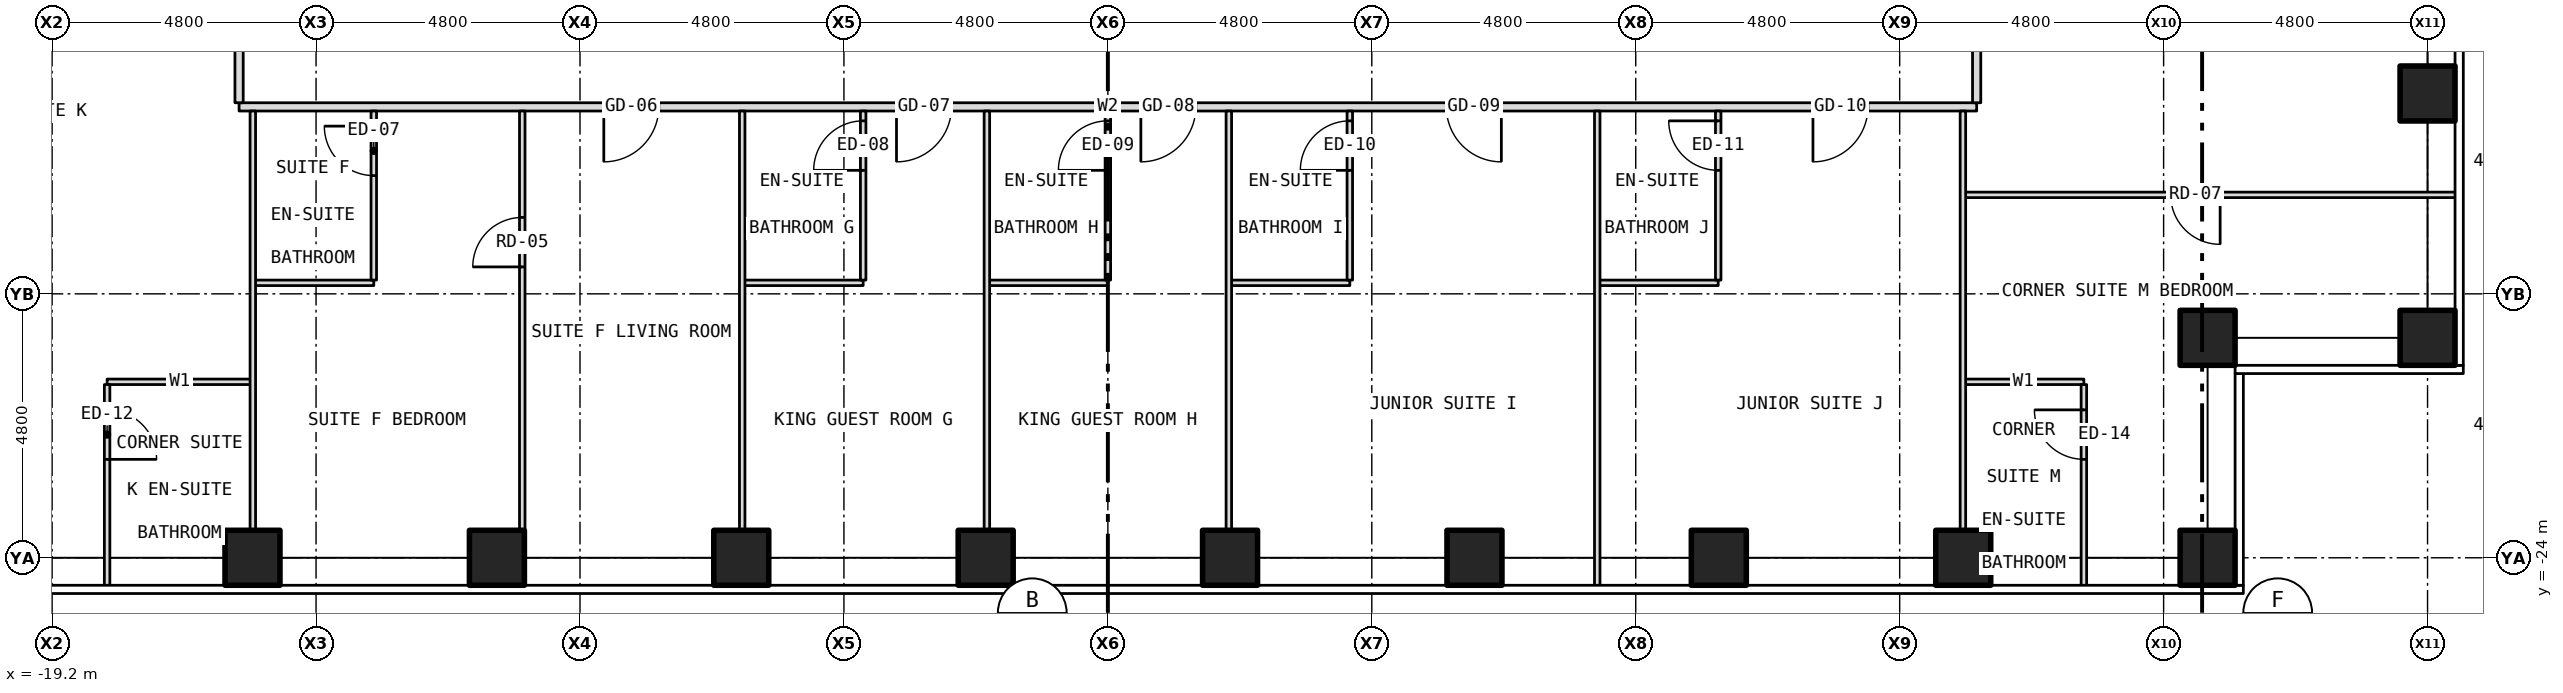
"""IFC4 building model, lengths in metres.
Left out: names, types, materials, properties, quantities, classifications, styles, units other than length and angle.
Written with IfcOpenShell. Run it as: python <this file> out.ifc"""

import sys

from ifc_helpers import new_model, si_unit, direction, frame, frame_2d, origin, origin_2d, place, context, subcontext, project, spatial, rectangle, hollow_rectangle, extrude, element, fill, save


model = new_model("IFC4")
c1 = context("Model", 3, precision=1e-05, world=origin(), true_north=direction((0.0, 1.0)))
c2 = subcontext(c1, "Body", "Model", "MODEL_VIEW")
j1 = project(units=[si_unit("LENGTHUNIT", "METRE"), si_unit("PLANEANGLEUNIT", "RADIAN")], contexts=[c1])
p1 = place(None, origin())
s1 = spatial("IfcSite", under=j1, at=p1, CompositionType="ELEMENT")
p2 = place(p1, origin())
s2 = spatial("IfcBuilding", under=s1, at=p2, CompositionType="ELEMENT")
p3 = place(p2, frame((0.0, 0.0, 46.0)))
s3 = spatial("IfcBuildingStorey", under=s2, at=p3, CompositionType="ELEMENT", Elevation=46.0)
for number, where, z_axis, x_axis in (
    (1, (-15.556, -24.0, -0.15), (0.0, 0.0, 1.0), (1.0, 0.0, 0.0)),
    (2, (-11.111, -24.0, -0.15), (0.0, 0.0, 1.0), (1.0, 0.0, 0.0)),
    (3, (-6.667, -24.0, -0.15), (0.0, 0.0, 1.0), (1.0, 0.0, 0.0)),
    (4, (-2.222, -24.0, -0.15), (0.0, 0.0, 1.0), (1.0, 0.0, 0.0)),
    (5, (2.222, -24.0, -0.15), (0.0, 0.0, 1.0), (1.0, 0.0, 0.0)),
    (6, (6.667, -24.0, -0.15), (0.0, 0.0, 1.0), (1.0, 0.0, 0.0)),
    (7, (11.111, -24.0, -0.15), (0.0, 0.0, 1.0), (1.0, 0.0, 0.0)),
    (8, (15.556, -24.0, -0.15), (0.0, 0.0, 1.0), (1.0, 0.0, 0.0)),
    (9, (20.0, -24.0, -0.15), (0.0, 0.0, 1.0), (1.0, 0.0, 0.0)),
    (10, (24.0, -20.0, -0.15), (0.0, 0.0, 1.0), (1.0, 0.0, 0.0)),
    (11, (24.0, -15.556, -0.15), (0.0, 0.0, 1.0), (1.0, 0.0, 0.0)),
    (12, (20.0, -20.0, -0.15), (0.0, 0.0, 1.0), (1.0, 0.0, 0.0)),
):
    element("IfcColumn", number, at=place(p3, frame(where, z_axis=z_axis, x_axis=x_axis)), inside=s3, PredefinedType="COLUMN", context=c2, shape_type="SweptSolid", body=[
        extrude(hollow_rectangle(XDim=1.0, YDim=1.0, WallThickness=0.06, at=origin_2d()), origin(), (0.0, 0.0, 1.0), 3.5),
    ])
p4 = place(p3, frame((-18.2, -20.8, 0.0), z_axis=(0.0, 0.0, 1.0), x_axis=(1.0, 0.0, 0.0)))
e13 = element("IfcWall", 13, at=p4, inside=s3, PredefinedType="PARTITIONING", context=c2, shape_type="SweptSolid", body=[
    extrude(rectangle(XDim=2.65, YDim=0.1, at=frame_2d((1.325, 0.0))), origin(), (0.0, 0.0, 1.0), 3.35),
])
for number, where, z_axis, x_axis in (
    (14, (15.55, -20.8, 0.0), (0.0, 0.0, 1.0), (1.0, 0.0, 0.0)),
    (15, (-15.55, -19.0, 0.0), (0.0, 0.0, 1.0), (1.0, 0.0, 0.0)),
    (16, (-6.65, -19.0, 0.0), (0.0, 0.0, 1.0), (1.0, 0.0, 0.0)),
    (17, (-2.2, -19.0, 0.0), (0.0, 0.0, 1.0), (1.0, 0.0, 0.0)),
    (18, (2.2, -19.0, 0.0), (0.0, 0.0, 1.0), (1.0, 0.0, 0.0)),
):
    element("IfcWall", number, at=place(p3, frame(where, z_axis=z_axis, x_axis=x_axis)), inside=s3, PredefinedType="PARTITIONING", context=c2, shape_type="SweptSolid", body=[
        extrude(rectangle(XDim=2.2, YDim=0.1, at=frame_2d((1.1, 0.0))), origin(), (0.0, 0.0, 1.0), 3.35),
    ])
p5 = place(p3, frame((8.9, -19.0, 0.0), z_axis=(0.0, 0.0, 1.0), x_axis=(1.0, 0.0, 0.0)))
e19 = element("IfcWall", 19, at=p5, inside=s3, PredefinedType="PARTITIONING", context=c2, shape_type="SweptSolid", body=[
    extrude(rectangle(XDim=2.2, YDim=0.1, at=frame_2d((1.1, 0.0))), origin(), (0.0, 0.0, 1.0), 3.35),
])
p6 = place(p3, frame((15.55, -17.4, 0.0), z_axis=(0.0, 0.0, 1.0), x_axis=(1.0, 0.0, 0.0)))
e20 = element("IfcWall", 20, at=p6, inside=s3, PredefinedType="PARTITIONING", context=c2, shape_type="SweptSolid", body=[
    extrude(rectangle(XDim=8.98, YDim=0.1, at=frame_2d((4.49, 0.0))), origin(), (0.0, 0.0, 1.0), 3.35),
])
p7 = place(p6, frame((3.778, 0.0, 0.0)))
e21 = element("IfcOpeningElement", 21, at=p7, cuts=e20, PredefinedType="OPENING", context=c2, shape_type="SweptSolid", body=[
    extrude(rectangle(XDim=0.9, YDim=2.1, at=frame_2d((0.45, 1.05))), frame((0.0, 0.062, 0.0), z_axis=(0.0, -1.0, 0.0), x_axis=(1.0, 0.0, 0.0)), (0.0, 0.0, 1.0), 0.124),
])
p8 = place(p3, frame((-15.8, -15.8, 0.0), z_axis=(0.0, 0.0, 1.0), x_axis=(1.0, 0.0, 0.0)))
e22 = element("IfcWall", 22, at=p8, inside=s3, PredefinedType="PARTITIONING", context=c2, shape_type="SweptSolid", body=[
    extrude(rectangle(XDim=31.6, YDim=0.15, at=frame_2d((15.8, 0.0))), origin(), (0.0, 0.0, 1.0), 3.35),
])
p9 = place(p8, frame((6.633, 0.0, 0.0)))
e23 = element("IfcOpeningElement", 23, at=p9, cuts=e22, PredefinedType="OPENING", context=c2, shape_type="SweptSolid", body=[
    extrude(rectangle(XDim=1.0, YDim=2.1, at=frame_2d((0.5, 1.05))), frame((0.0, 0.087, 0.0), z_axis=(0.0, -1.0, 0.0), x_axis=(1.0, 0.0, 0.0)), (0.0, 0.0, 1.0), 0.174),
])
p10 = place(p8, frame((11.956, 0.0, 0.0)))
e24 = element("IfcOpeningElement", 24, at=p10, cuts=e22, PredefinedType="OPENING", context=c2, shape_type="SweptSolid", body=[
    extrude(rectangle(XDim=1.0, YDim=2.1, at=frame_2d((0.5, 1.05))), frame((0.0, 0.087, 0.0), z_axis=(0.0, -1.0, 0.0), x_axis=(1.0, 0.0, 0.0)), (0.0, 0.0, 1.0), 0.174),
])
p11 = place(p8, frame((16.4, 0.0, 0.0)))
e25 = element("IfcOpeningElement", 25, at=p11, cuts=e22, PredefinedType="OPENING", context=c2, shape_type="SweptSolid", body=[
    extrude(rectangle(XDim=1.0, YDim=2.1, at=frame_2d((0.5, 1.05))), frame((0.0, 0.087, 0.0), z_axis=(0.0, -1.0, 0.0), x_axis=(1.0, 0.0, 0.0)), (0.0, 0.0, 1.0), 0.174),
])
p12 = place(p8, frame((21.956, 0.0, 0.0)))
e26 = element("IfcOpeningElement", 26, at=p12, cuts=e22, PredefinedType="OPENING", context=c2, shape_type="SweptSolid", body=[
    extrude(rectangle(XDim=1.0, YDim=2.1, at=frame_2d((0.5, 1.05))), frame((0.0, 0.087, 0.0), z_axis=(0.0, -1.0, 0.0), x_axis=(1.0, 0.0, 0.0)), (0.0, 0.0, 1.0), 0.174),
])
p13 = place(p8, frame((28.623, 0.0, 0.0)))
e27 = element("IfcOpeningElement", 27, at=p13, cuts=e22, PredefinedType="OPENING", context=c2, shape_type="SweptSolid", body=[
    extrude(rectangle(XDim=1.0, YDim=2.1, at=frame_2d((0.5, 1.05))), frame((0.0, 0.087, 0.0), z_axis=(0.0, -1.0, 0.0), x_axis=(1.0, 0.0, 0.0)), (0.0, 0.0, 1.0), 0.174),
])
p14 = place(p3, frame((-18.2, -24.53, 0.0), z_axis=(0.0, 0.0, 1.0), x_axis=(0.0, 1.0, 0.0)))
e28 = element("IfcWall", 28, at=p14, inside=s3, PredefinedType="PARTITIONING", context=c2, shape_type="SweptSolid", body=[
    extrude(rectangle(XDim=3.68, YDim=0.1, at=frame_2d((1.84, 0.0))), origin(), (0.0, 0.0, 1.0), 3.35),
])
p15 = place(p14, frame((2.32, 0.0, 0.0)))
e29 = element("IfcOpeningElement", 29, at=p15, cuts=e28, PredefinedType="OPENING", context=c2, shape_type="SweptSolid", body=[
    extrude(rectangle(XDim=0.9, YDim=2.1, at=frame_2d((0.45, 1.05))), frame((0.0, 0.062, 0.0), z_axis=(0.0, -1.0, 0.0), x_axis=(1.0, 0.0, 0.0)), (0.0, 0.0, 1.0), 0.124),
])
p16 = place(p3, frame((-15.8, -15.725, 0.0), z_axis=(0.0, 0.0, 1.0), x_axis=(0.0, 1.0, 0.0)))
e30 = element("IfcWall", 30, at=p16, inside=s3, PredefinedType="PARTITIONING", context=c2, shape_type="SweptSolid", body=[
    extrude(rectangle(XDim=4.805, YDim=0.15, at=frame_2d((2.403, 0.0))), origin(), (0.0, 0.0, 1.0), 3.35),
])
p17 = place(p16, frame((3.025, 0.0, 0.0)))
e31 = element("IfcOpeningElement", 31, at=p17, cuts=e30, PredefinedType="OPENING", context=c2, shape_type="SweptSolid", body=[
    extrude(rectangle(XDim=1.0, YDim=2.1, at=frame_2d((0.5, 1.05))), frame((0.0, 0.087, 0.0), z_axis=(0.0, -1.0, 0.0), x_axis=(1.0, 0.0, 0.0)), (0.0, 0.0, 1.0), 0.174),
])
p18 = place(p3, frame((-15.55, -23.88, 0.0), z_axis=(0.0, 0.0, 1.0), x_axis=(0.0, 1.0, 0.0)))
e32 = element("IfcWall", 32, at=p18, inside=s3, PredefinedType="PARTITIONING", context=c2, shape_type="SweptSolid", body=[
    extrude(rectangle(XDim=8.005, YDim=0.1, at=frame_2d((4.002, 0.0))), origin(), (0.0, 0.0, 1.0), 3.35),
])
p19 = place(p3, frame((-13.35, -18.95, 0.0), z_axis=(0.0, 0.0, 1.0), x_axis=(0.0, 1.0, 0.0)))
e33 = element("IfcWall", 33, at=p19, inside=s3, PredefinedType="PARTITIONING", context=c2, shape_type="SweptSolid", body=[
    extrude(rectangle(XDim=3.075, YDim=0.1, at=frame_2d((1.538, 0.0))), origin(), (0.0, 0.0, 1.0), 3.35),
])
p20 = place(p19, frame((1.9, 0.0, 0.0)))
e34 = element("IfcOpeningElement", 34, at=p20, cuts=e33, PredefinedType="OPENING", context=c2, shape_type="SweptSolid", body=[
    extrude(rectangle(XDim=0.9, YDim=2.1, at=frame_2d((0.45, 1.05))), frame((0.0, 0.062, 0.0), z_axis=(0.0, -1.0, 0.0), x_axis=(1.0, 0.0, 0.0)), (0.0, 0.0, 1.0), 0.124),
])
p21 = place(p3, frame((-10.65, -23.88, 0.0), z_axis=(0.0, 0.0, 1.0), x_axis=(0.0, 1.0, 0.0)))
e35 = element("IfcWall", 35, at=p21, inside=s3, PredefinedType="PARTITIONING", context=c2, shape_type="SweptSolid", body=[
    extrude(rectangle(XDim=8.005, YDim=0.1, at=frame_2d((4.002, 0.0))), origin(), (0.0, 0.0, 1.0), 3.35),
])
p22 = place(p21, frame((5.17, 0.0, 0.0)))
e36 = element("IfcOpeningElement", 36, at=p22, cuts=e35, PredefinedType="OPENING", context=c2, shape_type="SweptSolid", body=[
    extrude(rectangle(XDim=0.9, YDim=2.1, at=frame_2d((0.45, 1.05))), frame((0.0, 0.062, 0.0), z_axis=(0.0, -1.0, 0.0), x_axis=(1.0, 0.0, 0.0)), (0.0, 0.0, 1.0), 0.124),
])
p23 = place(p3, frame((-6.65, -23.88, 0.0), z_axis=(0.0, 0.0, 1.0), x_axis=(0.0, 1.0, 0.0)))
e37 = element("IfcWall", 37, at=p23, inside=s3, PredefinedType="PARTITIONING", context=c2, shape_type="SweptSolid", body=[
    extrude(rectangle(XDim=8.005, YDim=0.1, at=frame_2d((4.002, 0.0))), origin(), (0.0, 0.0, 1.0), 3.35),
])
p24 = place(p3, frame((-4.45, -18.95, 0.0), z_axis=(0.0, 0.0, 1.0), x_axis=(0.0, 1.0, 0.0)))
e38 = element("IfcWall", 38, at=p24, inside=s3, PredefinedType="PARTITIONING", context=c2, shape_type="SweptSolid", body=[
    extrude(rectangle(XDim=3.075, YDim=0.1, at=frame_2d((1.538, 0.0))), origin(), (0.0, 0.0, 1.0), 3.35),
])
p25 = place(p24, frame((1.996, 0.0, 0.0)))
e39 = element("IfcOpeningElement", 39, at=p25, cuts=e38, PredefinedType="OPENING", context=c2, shape_type="SweptSolid", body=[
    extrude(rectangle(XDim=0.9, YDim=2.1, at=frame_2d((0.45, 1.05))), frame((0.0, 0.062, 0.0), z_axis=(0.0, -1.0, 0.0), x_axis=(1.0, 0.0, 0.0)), (0.0, 0.0, 1.0), 0.124),
])
p26 = place(p3, frame((-2.2, -23.88, 0.0), z_axis=(0.0, 0.0, 1.0), x_axis=(0.0, 1.0, 0.0)))
e40 = element("IfcWall", 40, at=p26, inside=s3, PredefinedType="PARTITIONING", context=c2, shape_type="SweptSolid", body=[
    extrude(rectangle(XDim=8.005, YDim=0.1, at=frame_2d((4.002, 0.0))), origin(), (0.0, 0.0, 1.0), 3.35),
])
p27 = place(p3, frame((0.0, -18.95, 0.0), z_axis=(0.0, 0.0, 1.0), x_axis=(0.0, 1.0, 0.0)))
e41 = element("IfcWall", 41, at=p27, inside=s3, PredefinedType="PARTITIONING", context=c2, shape_type="SweptSolid", body=[
    extrude(rectangle(XDim=3.075, YDim=0.1, at=frame_2d((1.538, 0.0))), origin(), (0.0, 0.0, 1.0), 2.728),
])
p28 = place(p27, frame((1.996, 0.0, 0.0)))
e42 = element("IfcOpeningElement", 42, at=p28, cuts=e41, PredefinedType="OPENING", context=c2, shape_type="SweptSolid", body=[
    extrude(rectangle(XDim=0.9, YDim=2.1, at=frame_2d((0.45, 1.05))), frame((0.0, 0.062, 0.0), z_axis=(0.0, -1.0, 0.0), x_axis=(1.0, 0.0, 0.0)), (0.0, 0.0, 1.0), 0.124),
])
p29 = place(p3, frame((2.2, -23.88, 0.0), z_axis=(0.0, 0.0, 1.0), x_axis=(0.0, 1.0, 0.0)))
e43 = element("IfcWall", 43, at=p29, inside=s3, PredefinedType="PARTITIONING", context=c2, shape_type="SweptSolid", body=[
    extrude(rectangle(XDim=8.005, YDim=0.1, at=frame_2d((4.002, 0.0))), origin(), (0.0, 0.0, 1.0), 3.35),
])
p30 = place(p3, frame((4.4, -18.95, 0.0), z_axis=(0.0, 0.0, 1.0), x_axis=(0.0, 1.0, 0.0)))
e44 = element("IfcWall", 44, at=p30, inside=s3, PredefinedType="PARTITIONING", context=c2, shape_type="SweptSolid", body=[
    extrude(rectangle(XDim=3.075, YDim=0.1, at=frame_2d((1.538, 0.0))), origin(), (0.0, 0.0, 1.0), 3.35),
])
p31 = place(p30, frame((1.996, 0.0, 0.0)))
e45 = element("IfcOpeningElement", 45, at=p31, cuts=e44, PredefinedType="OPENING", context=c2, shape_type="SweptSolid", body=[
    extrude(rectangle(XDim=0.9, YDim=2.1, at=frame_2d((0.45, 1.05))), frame((0.0, 0.062, 0.0), z_axis=(0.0, -1.0, 0.0), x_axis=(1.0, 0.0, 0.0)), (0.0, 0.0, 1.0), 0.124),
])
p32 = place(p3, frame((8.9, -24.53, 0.0), z_axis=(0.0, 0.0, 1.0), x_axis=(0.0, 1.0, 0.0)))
e46 = element("IfcWall", 46, at=p32, inside=s3, PredefinedType="PARTITIONING", context=c2, shape_type="SweptSolid", body=[
    extrude(rectangle(XDim=8.655, YDim=0.1, at=frame_2d((4.328, 0.0))), origin(), (0.0, 0.0, 1.0), 3.35),
])
p33 = place(p3, frame((11.1, -18.95, 0.0), z_axis=(0.0, 0.0, 1.0), x_axis=(0.0, 1.0, 0.0)))
e47 = element("IfcWall", 47, at=p33, inside=s3, PredefinedType="PARTITIONING", context=c2, shape_type="SweptSolid", body=[
    extrude(rectangle(XDim=3.075, YDim=0.1, at=frame_2d((1.538, 0.0))), origin(), (0.0, 0.0, 1.0), 3.35),
])
p34 = place(p33, frame((1.996, 0.0, 0.0)))
e48 = element("IfcOpeningElement", 48, at=p34, cuts=e47, PredefinedType="OPENING", context=c2, shape_type="SweptSolid", body=[
    extrude(rectangle(XDim=0.9, YDim=2.1, at=frame_2d((0.45, 1.05))), frame((0.0, 0.062, 0.0), z_axis=(0.0, -1.0, 0.0), x_axis=(1.0, 0.0, 0.0)), (0.0, 0.0, 1.0), 0.124),
])
p35 = place(p3, frame((15.55, -23.88, 0.0), z_axis=(0.0, 0.0, 1.0), x_axis=(0.0, 1.0, 0.0)))
e49 = element("IfcWall", 49, at=p35, inside=s3, PredefinedType="PARTITIONING", context=c2, shape_type="SweptSolid", body=[
    extrude(rectangle(XDim=8.005, YDim=0.1, at=frame_2d((4.002, 0.0))), origin(), (0.0, 0.0, 1.0), 3.35),
])
p36 = place(p3, frame((15.8, -15.725, 0.0), z_axis=(0.0, 0.0, 1.0), x_axis=(0.0, 1.0, 0.0)))
e50 = element("IfcWall", 50, at=p36, inside=s3, PredefinedType="PARTITIONING", context=c2, shape_type="SweptSolid", body=[
    extrude(rectangle(XDim=4.805, YDim=0.15, at=frame_2d((2.403, 0.0))), origin(), (0.0, 0.0, 1.0), 3.35),
])
p37 = place(p36, frame((3.025, 0.0, 0.0)))
e51 = element("IfcOpeningElement", 51, at=p37, cuts=e50, PredefinedType="OPENING", context=c2, shape_type="SweptSolid", body=[
    extrude(rectangle(XDim=1.0, YDim=2.1, at=frame_2d((0.5, 1.05))), frame((0.0, 0.087, 0.0), z_axis=(0.0, -1.0, 0.0), x_axis=(1.0, 0.0, 0.0)), (0.0, 0.0, 1.0), 0.174),
])
p38 = place(p3, frame((17.75, -24.53, 0.0), z_axis=(0.0, 0.0, 1.0), x_axis=(0.0, 1.0, 0.0)))
e52 = element("IfcWall", 52, at=p38, inside=s3, PredefinedType="PARTITIONING", context=c2, shape_type="SweptSolid", body=[
    extrude(rectangle(XDim=3.68, YDim=0.1, at=frame_2d((1.84, 0.0))), origin(), (0.0, 0.0, 1.0), 3.35),
])
p39 = place(p38, frame((2.32, 0.0, 0.0)))
e53 = element("IfcOpeningElement", 53, at=p39, cuts=e52, PredefinedType="OPENING", context=c2, shape_type="SweptSolid", body=[
    extrude(rectangle(XDim=0.9, YDim=2.1, at=frame_2d((0.45, 1.05))), frame((0.0, 0.062, 0.0), z_axis=(0.0, -1.0, 0.0), x_axis=(1.0, 0.0, 0.0)), (0.0, 0.0, 1.0), 0.124),
])
p40 = place(p9, origin())
e54 = element("IfcDoor", 54, at=p40, inside=s3, OperationType="SINGLE_SWING_LEFT", PredefinedType="DOOR", context=c2, shape_type="SweptSolid", body=[
    extrude(rectangle(XDim=1.0, YDim=2.1, at=frame_2d((0.5, 1.05))), frame((0.0, 0.025, 0.0), z_axis=(0.0, -1.0, 0.0), x_axis=(1.0, 0.0, 0.0)), (0.0, 0.0, 1.0), 0.05),
])
fill(e23, e54)
p41 = place(p22, origin())
e55 = element("IfcDoor", 55, at=p41, inside=s3, OperationType="SINGLE_SWING_LEFT", PredefinedType="DOOR", context=c2, shape_type="SweptSolid", body=[
    extrude(rectangle(XDim=0.9, YDim=2.1, at=frame_2d((0.45, 1.05))), frame((0.0, 0.025, 0.0), z_axis=(0.0, -1.0, 0.0), x_axis=(1.0, 0.0, 0.0)), (0.0, 0.0, 1.0), 0.05),
])
fill(e36, e55)
p42 = place(p20, origin())
e56 = element("IfcDoor", 56, at=p42, inside=s3, OperationType="SINGLE_SWING_RIGHT", PredefinedType="DOOR", context=c2, shape_type="SweptSolid", body=[
    extrude(rectangle(XDim=0.9, YDim=2.1, at=frame_2d((0.45, 1.05))), frame((0.0, 0.025, 0.0), z_axis=(0.0, -1.0, 0.0), x_axis=(1.0, 0.0, 0.0)), (0.0, 0.0, 1.0), 0.05),
])
fill(e34, e56)
p43 = place(p10, origin())
e57 = element("IfcDoor", 57, at=p43, inside=s3, OperationType="SINGLE_SWING_LEFT", PredefinedType="DOOR", context=c2, shape_type="SweptSolid", body=[
    extrude(rectangle(XDim=1.0, YDim=2.1, at=frame_2d((0.5, 1.05))), frame((0.0, 0.025, 0.0), z_axis=(0.0, -1.0, 0.0), x_axis=(1.0, 0.0, 0.0)), (0.0, 0.0, 1.0), 0.05),
])
fill(e24, e57)
p44 = place(p25, origin())
e58 = element("IfcDoor", 58, at=p44, inside=s3, OperationType="SINGLE_SWING_LEFT", PredefinedType="DOOR", context=c2, shape_type="SweptSolid", body=[
    extrude(rectangle(XDim=0.9, YDim=2.1, at=frame_2d((0.45, 1.05))), frame((0.0, 0.025, 0.0), z_axis=(0.0, -1.0, 0.0), x_axis=(1.0, 0.0, 0.0)), (0.0, 0.0, 1.0), 0.05),
])
fill(e39, e58)
p45 = place(p11, origin())
e59 = element("IfcDoor", 59, at=p45, inside=s3, OperationType="SINGLE_SWING_LEFT", PredefinedType="DOOR", context=c2, shape_type="SweptSolid", body=[
    extrude(rectangle(XDim=1.0, YDim=2.1, at=frame_2d((0.5, 1.05))), frame((0.0, 0.025, 0.0), z_axis=(0.0, -1.0, 0.0), x_axis=(1.0, 0.0, 0.0)), (0.0, 0.0, 1.0), 0.05),
])
fill(e25, e59)
p46 = place(p28, origin())
e60 = element("IfcDoor", 60, at=p46, inside=s3, OperationType="SINGLE_SWING_LEFT", PredefinedType="DOOR", context=c2, shape_type="SweptSolid", body=[
    extrude(rectangle(XDim=0.9, YDim=2.1, at=frame_2d((0.45, 1.05))), frame((0.0, 0.025, 0.0), z_axis=(0.0, -1.0, 0.0), x_axis=(1.0, 0.0, 0.0)), (0.0, 0.0, 1.0), 0.05),
])
fill(e42, e60)
p47 = place(p12, origin())
e61 = element("IfcDoor", 61, at=p47, inside=s3, OperationType="SINGLE_SWING_RIGHT", PredefinedType="DOOR", context=c2, shape_type="SweptSolid", body=[
    extrude(rectangle(XDim=1.0, YDim=2.1, at=frame_2d((0.5, 1.05))), frame((0.0, 0.025, 0.0), z_axis=(0.0, -1.0, 0.0), x_axis=(1.0, 0.0, 0.0)), (0.0, 0.0, 1.0), 0.05),
])
fill(e26, e61)
p48 = place(p31, origin())
e62 = element("IfcDoor", 62, at=p48, inside=s3, OperationType="SINGLE_SWING_LEFT", PredefinedType="DOOR", context=c2, shape_type="SweptSolid", body=[
    extrude(rectangle(XDim=0.9, YDim=2.1, at=frame_2d((0.45, 1.05))), frame((0.0, 0.025, 0.0), z_axis=(0.0, -1.0, 0.0), x_axis=(1.0, 0.0, 0.0)), (0.0, 0.0, 1.0), 0.05),
])
fill(e45, e62)
p49 = place(p13, origin())
e63 = element("IfcDoor", 63, at=p49, inside=s3, OperationType="SINGLE_SWING_LEFT", PredefinedType="DOOR", context=c2, shape_type="SweptSolid", body=[
    extrude(rectangle(XDim=1.0, YDim=2.1, at=frame_2d((0.5, 1.05))), frame((0.0, 0.025, 0.0), z_axis=(0.0, -1.0, 0.0), x_axis=(1.0, 0.0, 0.0)), (0.0, 0.0, 1.0), 0.05),
])
fill(e27, e63)
p50 = place(p34, origin())
e64 = element("IfcDoor", 64, at=p50, inside=s3, OperationType="SINGLE_SWING_RIGHT", PredefinedType="DOOR", context=c2, shape_type="SweptSolid", body=[
    extrude(rectangle(XDim=0.9, YDim=2.1, at=frame_2d((0.45, 1.05))), frame((0.0, 0.025, 0.0), z_axis=(0.0, -1.0, 0.0), x_axis=(1.0, 0.0, 0.0)), (0.0, 0.0, 1.0), 0.05),
])
fill(e48, e64)
p51 = place(p15, origin())
e65 = element("IfcDoor", 65, at=p51, inside=s3, OperationType="SINGLE_SWING_LEFT", PredefinedType="DOOR", context=c2, shape_type="SweptSolid", body=[
    extrude(rectangle(XDim=0.9, YDim=2.1, at=frame_2d((0.45, 1.05))), frame((0.0, 0.025, 0.0), z_axis=(0.0, -1.0, 0.0), x_axis=(1.0, 0.0, 0.0)), (0.0, 0.0, 1.0), 0.05),
])
fill(e29, e65)
p52 = place(p7, origin())
e66 = element("IfcDoor", 66, at=p52, inside=s3, OperationType="SINGLE_SWING_RIGHT", PredefinedType="DOOR", context=c2, shape_type="SweptSolid", body=[
    extrude(rectangle(XDim=0.9, YDim=2.1, at=frame_2d((0.45, 1.05))), frame((0.0, 0.025, 0.0), z_axis=(0.0, -1.0, 0.0), x_axis=(1.0, 0.0, 0.0)), (0.0, 0.0, 1.0), 0.05),
])
fill(e21, e66)
p53 = place(p39, origin())
e67 = element("IfcDoor", 67, at=p53, inside=s3, OperationType="SINGLE_SWING_RIGHT", PredefinedType="DOOR", context=c2, shape_type="SweptSolid", body=[
    extrude(rectangle(XDim=0.9, YDim=2.1, at=frame_2d((0.45, 1.05))), frame((0.0, 0.025, 0.0), z_axis=(0.0, -1.0, 0.0), x_axis=(1.0, 0.0, 0.0)), (0.0, 0.0, 1.0), 0.05),
])
fill(e53, e67)
save(model, sys.argv[1])
